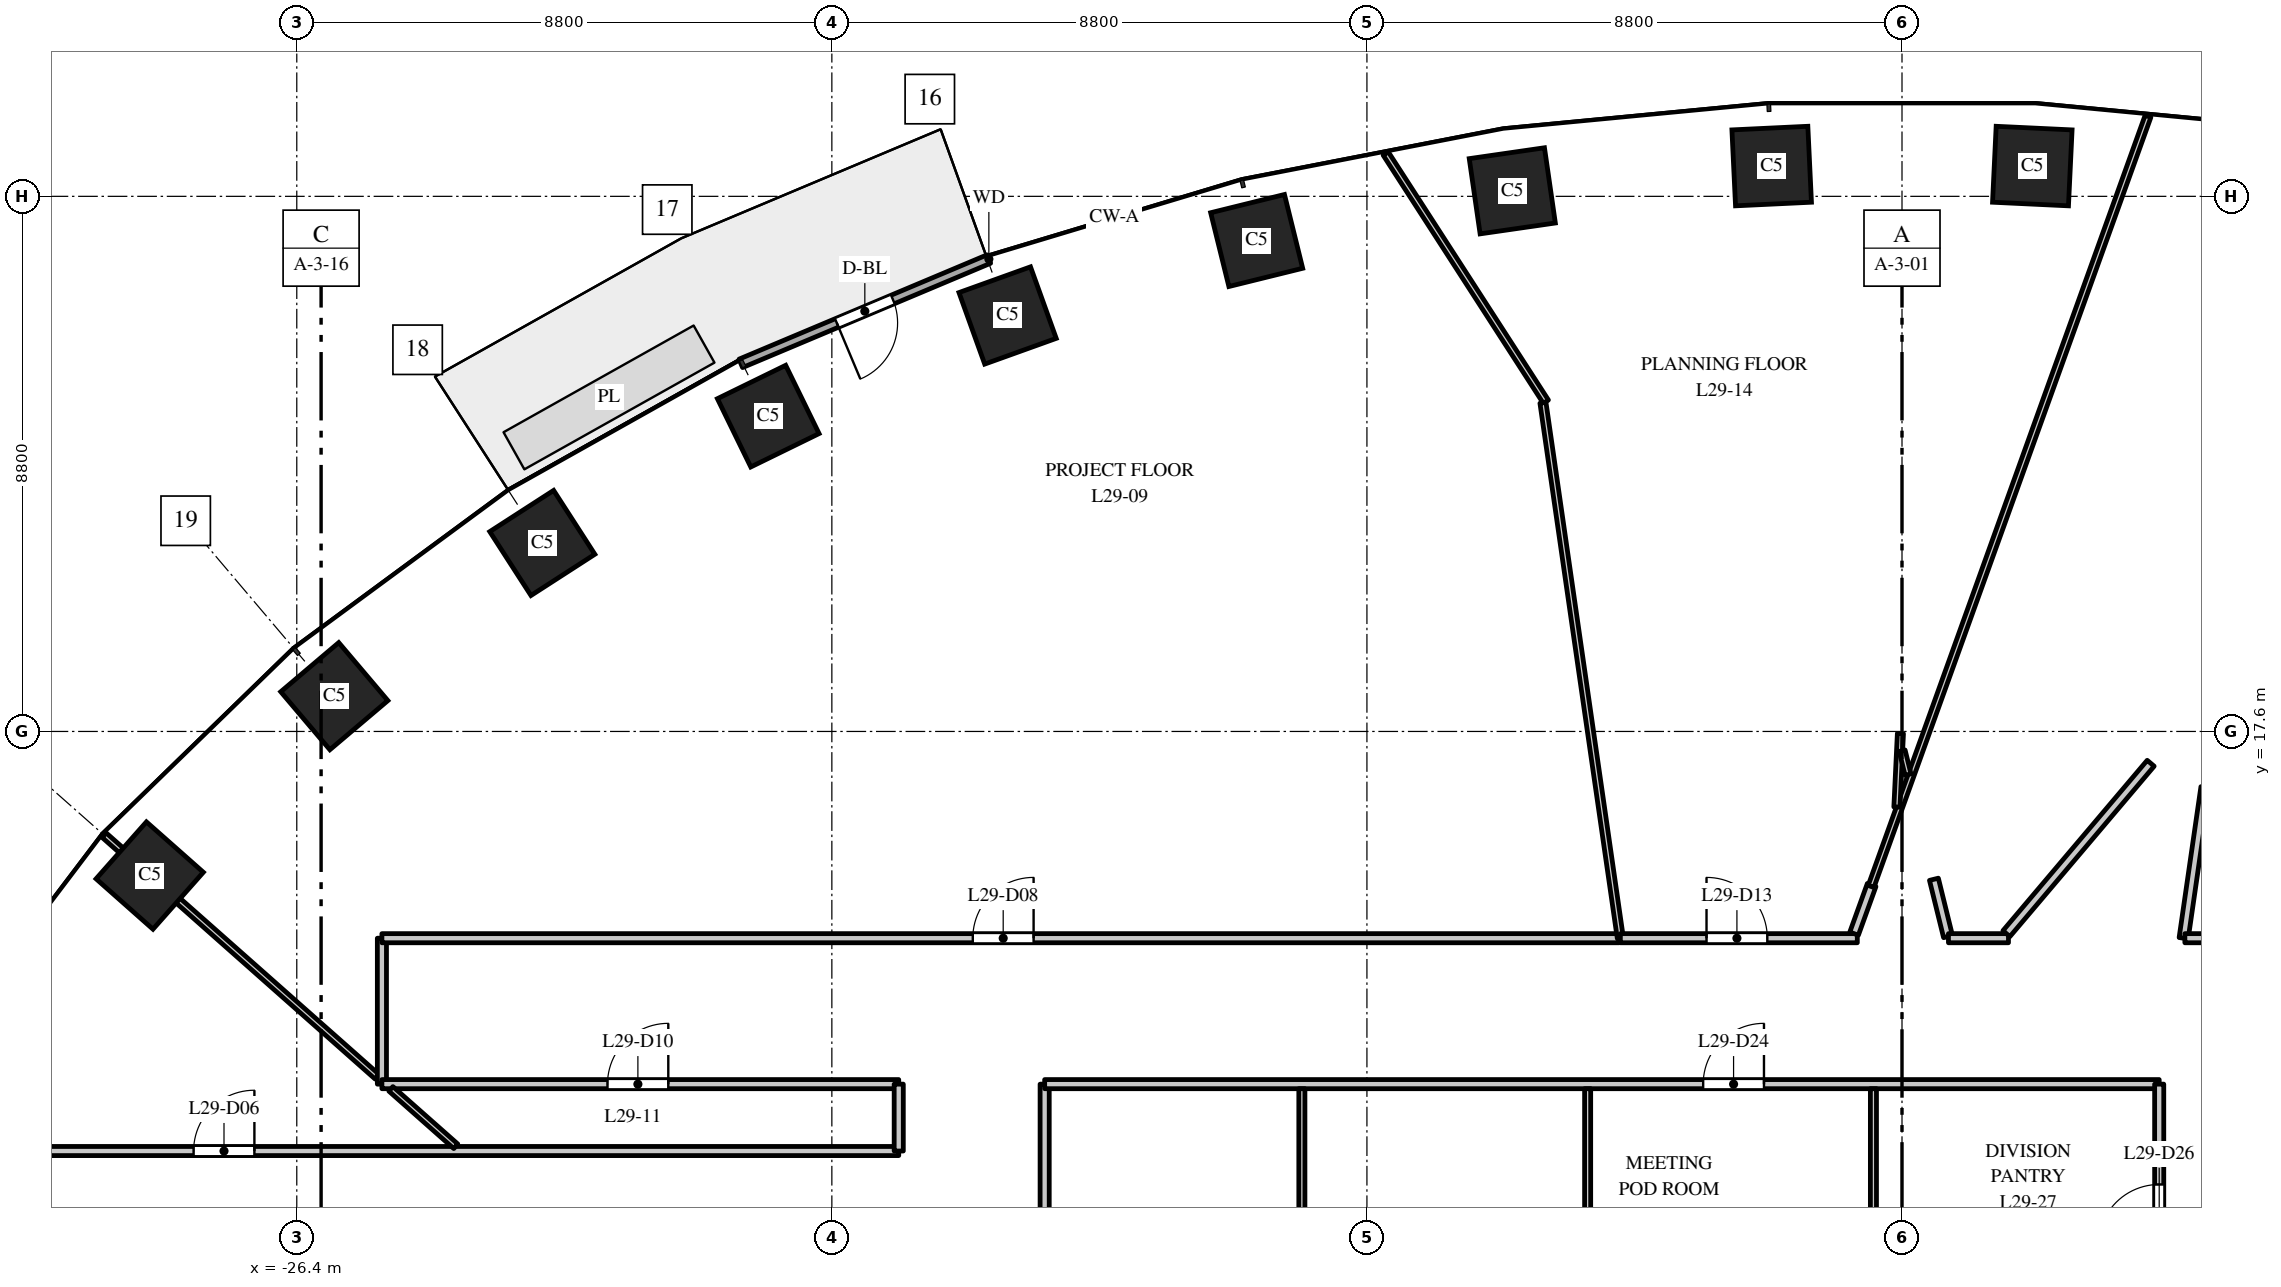
"""IFC4 building model, lengths in metres.
Left out: names, types, materials, properties, quantities, classifications, styles, units other than length and angle.
Written with IfcOpenShell. Run it as: python <this file> out.ifc"""

import sys

from ifc_helpers import new_model, si_unit, direction, frame, frame_2d, origin, origin_2d, place, context, subcontext, project, spatial, rectangle, extrude, element, fill, save


model = new_model("IFC4")
c1 = context("Model", 3, precision=1e-05, world=origin(), true_north=direction((0.0, 1.0)))
c2 = subcontext(c1, "Body", "Model", "MODEL_VIEW")
j1 = project(units=[si_unit("LENGTHUNIT", "METRE"), si_unit("PLANEANGLEUNIT", "RADIAN")], contexts=[c1])
p1 = place(None, origin())
s1 = spatial("IfcSite", under=j1, at=p1, CompositionType="ELEMENT")
p2 = place(p1, origin())
s2 = spatial("IfcBuilding", under=s1, at=p2, CompositionType="ELEMENT")
p3 = place(p2, frame((0.0, 0.0, 128.0)))
s3 = spatial("IfcBuildingStorey", under=s2, at=p3, CompositionType="ELEMENT", Elevation=128.0)
for number, where, z_axis, x_axis in (
    (1, (2.143, 26.898, 0.0), (0.0, 0.0, 1.0), (-0.999, 0.048, 0.0)),
    (2, (-2.143, 26.898, 0.0), (0.0, 0.0, 1.0), (-0.999, -0.048, 0.0)),
    (3, (-6.409, 26.491, 0.0), (0.0, 0.0, 1.0), (-0.99, -0.143, 0.0)),
    (4, (-10.613, 25.674, 0.0), (0.0, 0.0, 1.0), (-0.971, -0.24, 0.0)),
    (5, (-14.709, 24.441, 0.0), (0.0, 0.0, 1.0), (-0.941, -0.338, 0.0)),
    (6, (-18.646, 22.785, 0.0), (0.0, 0.0, 1.0), (-0.898, -0.439, 0.0)),
    (7, (-22.362, 20.7, 0.0), (0.0, 0.0, 1.0), (-0.84, -0.542, 0.0)),
    (8, (-25.783, 18.18, 0.0), (0.0, 0.0, 1.0), (-0.763, -0.646, 0.0)),
    (9, (-28.819, 15.23, 0.0), (0.0, 0.0, 1.0), (-0.663, -0.749, 0.0)),
):
    element("IfcColumn", number, at=place(p3, frame(where, z_axis=z_axis, x_axis=x_axis)), inside=s3, PredefinedType="COLUMN", context=c2, shape_type="SweptSolid", body=[
        extrude(rectangle(XDim=1.25, YDim=1.25, at=origin_2d()), origin(), (0.0, 0.0, 1.0), 4.0),
    ])
p4 = place(p3, frame((-15.018, 25.369, 0.0), z_axis=(0.0, 0.0, 1.0), x_axis=(-0.921816985161, -0.387625393736, 0.0)))
e10 = element("IfcWall", 10, at=p4, inside=s3, PredefinedType="STANDARD", context=c2, shape_type="SweptSolid", body=[
    extrude(rectangle(XDim=4.426, YDim=0.15, at=frame_2d((2.213, 0.0))), origin(), (0.0, 0.0, 1.0), 3.7),
])
p5 = place(p4, frame((1.713, 0.0, 0.0)))
e11 = element("IfcOpeningElement", 11, at=p5, cuts=e10, PredefinedType="OPENING", context=c2, shape_type="SweptSolid", body=[
    extrude(rectangle(XDim=1.0, YDim=2.4, at=frame_2d((0.5, 1.2))), frame((0.0, 0.085, 0.0), z_axis=(0.0, -1.0, 0.0), x_axis=(1.0, 0.0, 0.0)), (0.0, 0.0, 1.0), 0.17),
])
p6 = place(p3, frame((-31.5, 10.7, 0.0), z_axis=(0.0, 0.0, 1.0), x_axis=(1.0, 0.0, 0.0)))
e12 = element("IfcWall", 12, at=p6, inside=s3, PredefinedType="PARTITIONING", context=c2, shape_type="SweptSolid", body=[
    extrude(rectangle(XDim=15.0, YDim=0.15, at=frame_2d((7.5, 0.0))), origin(), (0.0, 0.0, 1.0), 3.1),
])
p7 = place(p6, frame((3.403, 0.0, 0.0)))
e13 = element("IfcOpeningElement", 13, at=p7, cuts=e12, PredefinedType="OPENING", context=c2, shape_type="SweptSolid", body=[
    extrude(rectangle(XDim=1.0, YDim=2.1, at=frame_2d((0.5, 1.05))), frame((0.0, 0.085, 0.0), z_axis=(0.0, -1.0, 0.0), x_axis=(1.0, 0.0, 0.0)), (0.0, 0.0, 1.0), 0.17),
])
p8 = place(p3, frame((-29.569, 15.895, 0.0), z_axis=(0.0, 0.0, 1.0), x_axis=(0.748903310324, -0.662679282749, 0.0)))
e14 = element("IfcWall", 14, at=p8, inside=s3, PredefinedType="PARTITIONING", context=c2, shape_type="SweptSolid", body=[
    extrude(rectangle(XDim=5.997, YDim=0.1, at=frame_2d((2.999, 0.0))), origin(), (0.0, 0.0, 1.0), 2.9),
])
p9 = place(p3, frame((-25.0, 11.8, 0.0), z_axis=(0.0, 0.0, 1.0), x_axis=(0.0, 1.0, 0.0)))
e15 = element("IfcWall", 15, at=p9, inside=s3, PredefinedType="PARTITIONING", context=c2, shape_type="SweptSolid", body=[
    extrude(rectangle(XDim=2.4, YDim=0.15, at=frame_2d((1.2, 0.0))), origin(), (0.0, 0.0, 1.0), 3.7),
])
p10 = place(p3, frame((-25.0, 11.8, 0.0), z_axis=(0.0, 0.0, 1.0), x_axis=(1.0, 0.0, 0.0)))
e16 = element("IfcWall", 16, at=p10, inside=s3, PredefinedType="PARTITIONING", context=c2, shape_type="SweptSolid", body=[
    extrude(rectangle(XDim=8.5, YDim=0.15, at=frame_2d((4.25, 0.0))), origin(), (0.0, 0.0, 1.0), 2.75),
])
p11 = place(p10, frame((3.71, 0.0, 0.0)))
e17 = element("IfcOpeningElement", 17, at=p11, cuts=e16, PredefinedType="OPENING", context=c2, shape_type="SweptSolid", body=[
    extrude(rectangle(XDim=1.0, YDim=2.1, at=frame_2d((0.5, 1.05))), frame((0.0, 0.085, 0.0), z_axis=(0.0, -1.0, 0.0), x_axis=(1.0, 0.0, 0.0)), (0.0, 0.0, 1.0), 0.17),
])
p12 = place(p3, frame((-25.0, 14.2, 0.0), z_axis=(0.0, 0.0, 1.0), x_axis=(1.0, 0.0, 0.0)))
e18 = element("IfcWall", 18, at=p12, inside=s3, PredefinedType="PARTITIONING", context=c2, shape_type="SweptSolid", body=[
    extrude(rectangle(XDim=20.348, YDim=0.15, at=frame_2d((10.174, 0.0))), origin(), (0.0, 0.0, 1.0), 2.75),
])
p13 = place(p12, frame((9.718, 0.0, 0.0)))
e19 = element("IfcOpeningElement", 19, at=p13, cuts=e18, PredefinedType="OPENING", context=c2, shape_type="SweptSolid", body=[
    extrude(rectangle(XDim=1.0, YDim=2.1, at=frame_2d((0.5, 1.05))), frame((0.0, 0.085, 0.0), z_axis=(0.0, -1.0, 0.0), x_axis=(1.0, 0.0, 0.0)), (0.0, 0.0, 1.0), 0.17),
])
p14 = place(p3, frame((-24.852, 11.722, 0.0), z_axis=(0.0, 0.0, 1.0), x_axis=(0.749052165765, -0.662511021013, 0.0)))
e20 = element("IfcWall", 20, at=p14, inside=s3, PredefinedType="PARTITIONING", context=c2, shape_type="SweptSolid", body=[
    extrude(rectangle(XDim=1.425, YDim=0.1, at=frame_2d((0.712, 0.0))), origin(), (0.0, 0.0, 1.0), 3.7),
])
p15 = place(p3, frame((-16.5, 10.7, 0.0), z_axis=(0.0, 0.0, 1.0), x_axis=(0.0, 1.0, 0.0)))
e21 = element("IfcWall", 21, at=p15, inside=s3, PredefinedType="PARTITIONING", context=c2, shape_type="SweptSolid", body=[
    extrude(rectangle(XDim=1.1, YDim=0.15, at=frame_2d((0.55, 0.0))), origin(), (0.0, 0.0, 1.0), 2.75),
])
p16 = place(p3, frame((-14.1, -11.8, 0.0), z_axis=(0.0, 0.0, 1.0), x_axis=(0.0, 1.0, 0.0)))
e22 = element("IfcWall", 22, at=p16, inside=s3, PredefinedType="PARTITIONING", context=c2, shape_type="SweptSolid", body=[
    extrude(rectangle(XDim=23.6, YDim=0.15, at=frame_2d((11.8, 0.0))), origin(), (0.0, 0.0, 1.0), 2.75),
])
p17 = place(p16, frame((11.4, 0.0, 0.0)))
e23 = element("IfcOpeningElement", 23, at=p17, cuts=e22, PredefinedType="OPENING", context=c2, shape_type="SweptSolid", body=[
    extrude(rectangle(XDim=1.0, YDim=2.1, at=frame_2d((0.5, 1.05))), frame((0.0, 0.085, 0.0), z_axis=(0.0, -1.0, 0.0), x_axis=(1.0, 0.0, 0.0)), (0.0, 0.0, 1.0), 0.17),
])
p18 = place(p3, frame((-14.1, 11.8, 0.0), z_axis=(0.0, 0.0, 1.0), x_axis=(1.0, 0.0, 0.0)))
e24 = element("IfcWall", 24, at=p18, inside=s3, PredefinedType="PARTITIONING", context=c2, shape_type="SweptSolid", body=[
    extrude(rectangle(XDim=18.33, YDim=0.15, at=frame_2d((9.165, 0.0))), origin(), (0.0, 0.0, 1.0), 2.85),
])
p19 = place(p18, frame((10.83, 0.0, 0.0)))
e25 = element("IfcOpeningElement", 25, at=p19, cuts=e24, PredefinedType="OPENING", context=c2, shape_type="SweptSolid", body=[
    extrude(rectangle(XDim=1.0, YDim=2.1, at=frame_2d((0.5, 1.05))), frame((0.0, 0.085, 0.0), z_axis=(0.0, -1.0, 0.0), x_axis=(1.0, 0.0, 0.0)), (0.0, 0.0, 1.0), 0.17),
])
p20 = place(p3, frame((-9.87, -11.725, 0.0), z_axis=(0.0, 0.0, 1.0), x_axis=(0.0, 1.0, 0.0)))
e26 = element("IfcWall", 26, at=p20, inside=s3, PredefinedType="PARTITIONING", context=c2, shape_type="SweptSolid", body=[
    extrude(rectangle(XDim=23.45, YDim=0.1, at=frame_2d((11.725, 0.0))), origin(), (0.0, 0.0, 1.0), 2.75),
])
p21 = place(p3, frame((-8.491, 27.104, 0.0), z_axis=(0.0, 0.0, 1.0), x_axis=(0.542285995048, -0.840193965448, 0.0)))
e27 = element("IfcWall", 27, at=p21, inside=s3, PredefinedType="PARTITIONING", context=c2, shape_type="SweptSolid", body=[
    extrude(rectangle(XDim=4.857, YDim=0.1, at=frame_2d((2.429, 0.0))), origin(), (0.0, 0.0, 1.0), 2.9),
])
p22 = place(p3, frame((-5.905, 23.005, 0.0), z_axis=(0.0, 0.0, 1.0), x_axis=(0.14308471533, -0.989710444645, 0.0)))
e28 = element("IfcWall", 28, at=p22, inside=s3, PredefinedType="PARTITIONING", context=c2, shape_type="SweptSolid", body=[
    extrude(rectangle(XDim=8.896, YDim=0.1, at=frame_2d((4.448, 0.0))), origin(), (0.0, 0.0, 1.0), 3.7),
])
p23 = place(p3, frame((-5.17, 6.105, 0.0), z_axis=(0.0, 0.0, 1.0), x_axis=(0.0, 1.0, 0.0)))
e29 = element("IfcWall", 29, at=p23, inside=s3, PredefinedType="PARTITIONING", context=c2, shape_type="SweptSolid", body=[
    extrude(rectangle(XDim=5.62, YDim=0.1, at=frame_2d((2.81, 0.0))), origin(), (0.0, 0.0, 1.0), 2.9),
])
p24 = place(p3, frame((-4.632, 14.2, 0.0), z_axis=(0.0, 0.0, 1.0), x_axis=(1.0, 0.0, 0.0)))
e30 = element("IfcWall", 30, at=p24, inside=s3, PredefinedType="PARTITIONING", context=c2, shape_type="SweptSolid", body=[
    extrude(rectangle(XDim=3.897, YDim=0.15, at=frame_2d((1.948, 0.0))), origin(), (0.0, 0.0, 1.0), 2.85),
])
p25 = place(p24, frame((1.417, 0.0, 0.0)))
e31 = element("IfcOpeningElement", 31, at=p25, cuts=e30, PredefinedType="OPENING", context=c2, shape_type="SweptSolid", body=[
    extrude(rectangle(XDim=1.0, YDim=2.1, at=frame_2d((0.5, 1.05))), frame((0.0, 0.085, 0.0), z_axis=(0.0, -1.0, 0.0), x_axis=(1.0, 0.0, 0.0)), (0.0, 0.0, 1.0), 0.17),
])
p26 = place(p3, frame((-0.788, 14.275, 0.0), z_axis=(0.0, 0.0, 1.0), x_axis=(0.339806666964, 0.940495310508, 0.0)))
e32 = element("IfcWall", 32, at=p26, inside=s3, PredefinedType="PARTITIONING", context=c2, shape_type="SweptSolid", body=[
    extrude(rectangle(XDim=0.851, YDim=0.15, at=frame_2d((0.425, 0.0))), origin(), (0.0, 0.0, 1.0), 3.7),
])
p27 = place(p3, frame((-0.509, 15.051, 0.0), z_axis=(0.0, 0.0, 1.0), x_axis=(0.338401519309, 0.941001812819, 0.0)))
e33 = element("IfcWall", 33, at=p27, inside=s3, PredefinedType="PARTITIONING", context=c2, shape_type="SweptSolid", body=[
    extrude(rectangle(XDim=13.46, YDim=0.1, at=frame_2d((6.73, 0.0))), origin(), (0.0, 0.0, 1.0), 2.9),
])
p28 = place(p3, frame((-0.47, 7.469, 0.0), z_axis=(0.0, 0.0, 1.0), x_axis=(0.0, 1.0, 0.0)))
e34 = element("IfcWall", 34, at=p28, inside=s3, PredefinedType="PARTITIONING", context=c2, shape_type="SweptSolid", body=[
    extrude(rectangle(XDim=4.256, YDim=0.1, at=frame_2d((2.128, 0.0))), origin(), (0.0, 0.0, 1.0), 2.9),
])
p29 = place(p3, frame((-0.084, 16.356, 0.0), z_axis=(0.0, 0.0, 1.0), x_axis=(0.047967320325, 0.998848905581, 0.0)))
e35 = element("IfcWall", 35, at=p29, inside=s3, PredefinedType="PARTITIONING", context=c2, shape_type="SweptSolid", body=[
    extrude(rectangle(XDim=1.211, YDim=0.1, at=frame_2d((0.606, 0.0))), origin(), (0.0, 0.0, 1.0), 3.7),
])
p30 = place(p3, frame((0.002, 17.284, 0.0), z_axis=(0.0, 0.0, 1.0), x_axis=(0.240121592304, -0.970742819139, 0.0)))
e36 = element("IfcWall", 36, at=p30, inside=s3, PredefinedType="PARTITIONING", context=c2, shape_type="SweptSolid", body=[
    extrude(rectangle(XDim=0.405, YDim=0.1, at=frame_2d((0.202, 0.0))), origin(), (0.0, 0.0, 1.0), 3.7),
])
p31 = place(p3, frame((0.525, 15.169, 0.0), z_axis=(0.0, 0.0, 1.0), x_axis=(0.239336638609, -0.97093664748, 0.0)))
e37 = element("IfcWall", 37, at=p31, inside=s3, PredefinedType="PARTITIONING", context=c2, shape_type="SweptSolid", body=[
    extrude(rectangle(XDim=0.97, YDim=0.15, at=frame_2d((0.485, 0.0))), origin(), (0.0, 0.0, 1.0), 3.7),
])
p32 = place(p3, frame((0.764, 14.2, 0.0), z_axis=(0.0, 0.0, 1.0), x_axis=(1.0, 0.0, 0.0)))
e38 = element("IfcWall", 38, at=p32, inside=s3, PredefinedType="PARTITIONING", context=c2, shape_type="SweptSolid", body=[
    extrude(rectangle(XDim=0.987, YDim=0.15, at=frame_2d((0.494, 0.0))), origin(), (0.0, 0.0, 1.0), 3.7),
])
p33 = place(p3, frame((1.717, 14.275, 0.0), z_axis=(0.0, 0.0, 1.0), x_axis=(0.64627898285, 0.763101222857, 0.0)))
e39 = element("IfcWall", 39, at=p33, inside=s3, PredefinedType="PARTITIONING", context=c2, shape_type="SweptSolid", body=[
    extrude(rectangle(XDim=3.672, YDim=0.15, at=frame_2d((1.836, 0.0))), origin(), (0.0, 0.0, 1.0), 2.85),
])
p34 = place(p3, frame((4.23, 6.592, 0.0), z_axis=(0.0, 0.0, 1.0), x_axis=(0.0, 1.0, 0.0)))
e40 = element("IfcWall", 40, at=p34, inside=s3, PredefinedType="PARTITIONING", context=c2, shape_type="SweptSolid", body=[
    extrude(rectangle(XDim=5.208, YDim=0.15, at=frame_2d((2.604, 0.0))), origin(), (0.0, 0.0, 1.0), 2.9),
])
p35 = place(p34, frame((2.558, 0.0, 0.0)))
e41 = element("IfcOpeningElement", 41, at=p35, cuts=e40, PredefinedType="OPENING", context=c2, shape_type="SweptSolid", body=[
    extrude(rectangle(XDim=1.0, YDim=2.1, at=frame_2d((0.5, 1.05))), frame((0.0, 0.085, 0.0), z_axis=(0.0, -1.0, 0.0), x_axis=(1.0, 0.0, 0.0)), (0.0, 0.0, 1.0), 0.17),
])
p36 = place(p3, frame((4.632, 14.2, 0.0), z_axis=(0.0, 0.0, 1.0), x_axis=(0.143111225566, 0.989706611636, 0.0)))
e42 = element("IfcWall", 42, at=p36, inside=s3, PredefinedType="PARTITIONING", context=c2, shape_type="SweptSolid", body=[
    extrude(rectangle(XDim=2.508, YDim=0.15, at=frame_2d((1.254, 0.0))), origin(), (0.0, 0.0, 1.0), 3.7),
])
p37 = place(p3, frame((4.652, 14.2, 0.0), z_axis=(0.0, 0.0, 1.0), x_axis=(1.0, 0.0, 0.0)))
e43 = element("IfcWall", 43, at=p37, inside=s3, PredefinedType="PARTITIONING", context=c2, shape_type="SweptSolid", body=[
    extrude(rectangle(XDim=20.348, YDim=0.15, at=frame_2d((10.174, 0.0))), origin(), (0.0, 0.0, 1.0), 2.85),
])
p38 = place(p37, frame((9.698, 0.0, 0.0)))
e44 = element("IfcOpeningElement", 44, at=p38, cuts=e43, PredefinedType="OPENING", context=c2, shape_type="SweptSolid", body=[
    extrude(rectangle(XDim=1.0, YDim=2.1, at=frame_2d((0.5, 1.05))), frame((0.0, 0.085, 0.0), z_axis=(0.0, -1.0, 0.0), x_axis=(1.0, 0.0, 0.0)), (0.0, 0.0, 1.0), 0.17),
])
p39 = place(p5, origin())
e45 = element("IfcDoor", 45, at=p39, inside=s3, OperationType="SINGLE_SWING_RIGHT", PredefinedType="DOOR", context=c2, shape_type="SweptSolid", body=[
    extrude(rectangle(XDim=1.0, YDim=2.4, at=frame_2d((0.5, 1.2))), frame((0.0, 0.025, 0.0), z_axis=(0.0, -1.0, 0.0), x_axis=(1.0, 0.0, 0.0)), (0.0, 0.0, 1.0), 0.05),
])
fill(e11, e45)
p40 = place(p7, origin())
e46 = element("IfcDoor", 46, at=p40, inside=s3, OperationType="SINGLE_SWING_RIGHT", PredefinedType="DOOR", context=c2, shape_type="SweptSolid", body=[
    extrude(rectangle(XDim=1.0, YDim=2.1, at=frame_2d((0.5, 1.05))), frame((0.0, 0.025, 0.0), z_axis=(0.0, -1.0, 0.0), x_axis=(1.0, 0.0, 0.0)), (0.0, 0.0, 1.0), 0.05),
])
fill(e13, e46)
p41 = place(p13, origin())
e47 = element("IfcDoor", 47, at=p41, inside=s3, OperationType="SINGLE_SWING_RIGHT", PredefinedType="DOOR", context=c2, shape_type="SweptSolid", body=[
    extrude(rectangle(XDim=1.0, YDim=2.1, at=frame_2d((0.5, 1.05))), frame((0.0, 0.025, 0.0), z_axis=(0.0, -1.0, 0.0), x_axis=(1.0, 0.0, 0.0)), (0.0, 0.0, 1.0), 0.05),
])
fill(e19, e47)
p42 = place(p11, origin())
e48 = element("IfcDoor", 48, at=p42, inside=s3, OperationType="SINGLE_SWING_RIGHT", PredefinedType="DOOR", context=c2, shape_type="SweptSolid", body=[
    extrude(rectangle(XDim=1.0, YDim=2.1, at=frame_2d((0.5, 1.05))), frame((0.0, 0.025, 0.0), z_axis=(0.0, -1.0, 0.0), x_axis=(1.0, 0.0, 0.0)), (0.0, 0.0, 1.0), 0.05),
])
fill(e17, e48)
p43 = place(p25, origin())
e49 = element("IfcDoor", 49, at=p43, inside=s3, OperationType="SINGLE_SWING_LEFT", PredefinedType="DOOR", context=c2, shape_type="SweptSolid", body=[
    extrude(rectangle(XDim=1.0, YDim=2.1, at=frame_2d((0.5, 1.05))), frame((0.0, 0.025, 0.0), z_axis=(0.0, -1.0, 0.0), x_axis=(1.0, 0.0, 0.0)), (0.0, 0.0, 1.0), 0.05),
])
fill(e31, e49)
p44 = place(p19, origin())
e50 = element("IfcDoor", 50, at=p44, inside=s3, OperationType="SINGLE_SWING_RIGHT", PredefinedType="DOOR", context=c2, shape_type="SweptSolid", body=[
    extrude(rectangle(XDim=1.0, YDim=2.1, at=frame_2d((0.5, 1.05))), frame((0.0, 0.025, 0.0), z_axis=(0.0, -1.0, 0.0), x_axis=(1.0, 0.0, 0.0)), (0.0, 0.0, 1.0), 0.05),
])
fill(e25, e50)
p45 = place(p35, origin())
e51 = element("IfcDoor", 51, at=p45, inside=s3, OperationType="SINGLE_SWING_LEFT", PredefinedType="DOOR", context=c2, shape_type="SweptSolid", body=[
    extrude(rectangle(XDim=1.0, YDim=2.1, at=frame_2d((0.5, 1.05))), frame((0.0, 0.025, 0.0), z_axis=(0.0, -1.0, 0.0), x_axis=(1.0, 0.0, 0.0)), (0.0, 0.0, 1.0), 0.05),
])
fill(e41, e51)
save(model, sys.argv[1])
